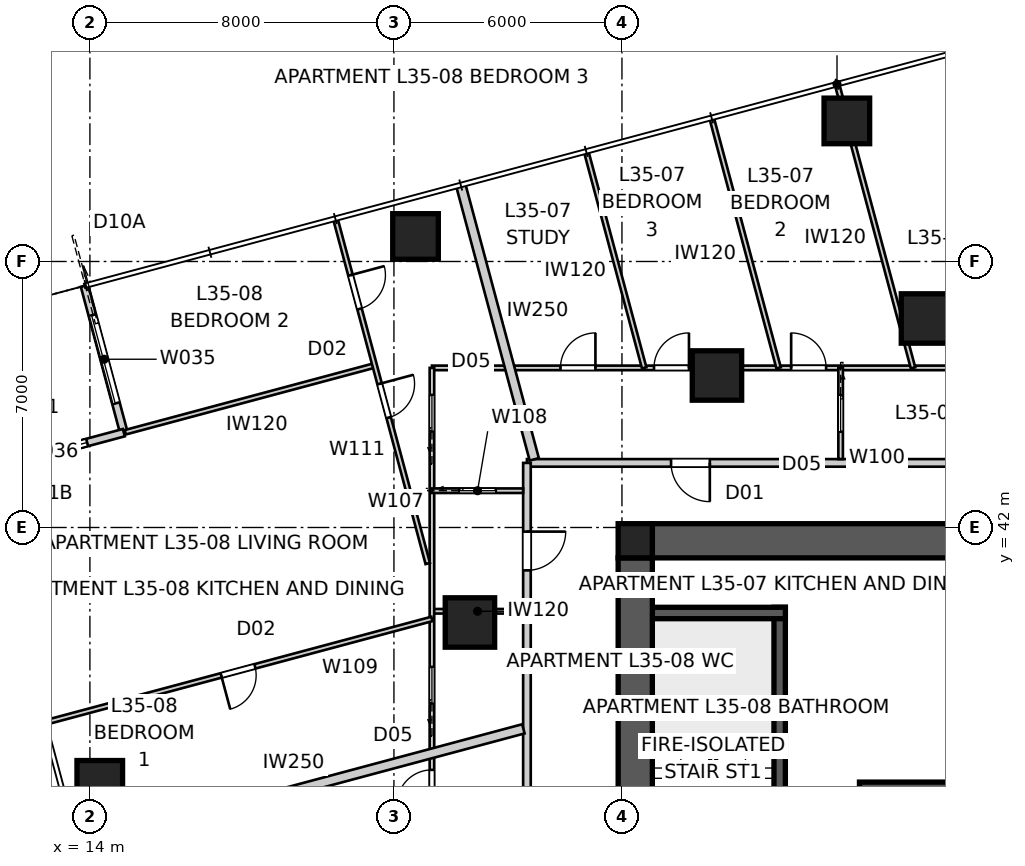
"""IFC4 building model, lengths in metres.
Left out: names, types, materials, properties, quantities, classifications, styles, units other than length and angle.
Written with IfcOpenShell. Run it as: python <this file> out.ifc"""

import sys

from ifc_helpers import new_model, si_unit, direction, frame, frame_2d, origin, origin_2d, place, context, subcontext, project, spatial, polyline, rectangle, outline, extrude, element, fill, save


model = new_model("IFC4")
c1 = context("Model", 3, precision=1e-05, world=origin(), true_north=direction((0.0, 1.0)))
c2 = subcontext(c1, "Body", "Model", "MODEL_VIEW")
j1 = project(units=[si_unit("LENGTHUNIT", "METRE"), si_unit("PLANEANGLEUNIT", "RADIAN")], contexts=[c1])
p1 = place(None, origin())
s1 = spatial("IfcSite", under=j1, at=p1, CompositionType="ELEMENT")
p2 = place(p1, origin())
s2 = spatial("IfcBuilding", under=s1, at=p2, CompositionType="ELEMENT")
p3 = place(p2, frame((0.0, 0.0, 128.6)))
s3 = spatial("IfcBuildingStorey", under=s2, at=p3, CompositionType="ELEMENT", Elevation=128.6)
p4 = place(p3, frame((28.8, 41.65, 0.0), z_axis=(0.0, 0.0, 1.0), x_axis=(1.0, 0.0, 0.0)))
e1 = element("IfcWall", 1, at=p4, inside=s3, PredefinedType="SHEAR", context=c2, shape_type="SweptSolid", body=[
    extrude(outline(polyline([(0.0, -0.45), (22.4, -0.45), (22.4, -0.025), (22.85, -0.025), (22.85, 0.025), (22.4, 0.025), (22.4, 0.45), (0.0, 0.45), (0.0, 0.025), (-0.45, 0.025), (-0.45, -0.025), (0.0, -0.025), (0.0, -0.45)])), origin(), (0.0, 0.0, 1.0), 3.4),
])
p5 = place(p3, frame((28.35, 41.2, 0.0), z_axis=(0.0, 0.0, 1.0), x_axis=(0.0, -1.0, 0.0)))
e2 = element("IfcWall", 2, at=p5, inside=s3, PredefinedType="SHEAR", context=c2, shape_type="SweptSolid", body=[
    extrude(outline(polyline([(0.0, -0.45), (22.4, -0.45), (22.4, -0.025), (22.85, -0.025), (22.85, 0.025), (22.4, 0.025), (22.4, 0.45), (0.0, 0.45), (0.0, 0.025), (-0.45, 0.025), (-0.45, -0.025), (0.0, -0.025), (0.0, -0.45)])), origin(), (0.0, 0.0, 1.0), 3.4),
])
p6 = place(p5, frame((11.14, 0.0, 0.0)))
e3 = element("IfcOpeningElement", 3, at=p6, cuts=e2, PredefinedType="OPENING", context=c2, shape_type="SweptSolid", body=[
    extrude(rectangle(XDim=1.02, YDim=2.4, at=frame_2d((0.51, 1.2))), frame((0.0, 0.46, 0.0), z_axis=(0.0, -1.0, 0.0), x_axis=(1.0, 0.0, 0.0)), (0.0, 0.0, 1.0), 0.92),
])
p7 = place(p3, frame((34.25, 35.15, 0.0), z_axis=(0.0, 0.0, 1.0), x_axis=(1.0, 0.0, 0.0)))
e4 = element("IfcWall", 4, at=p7, inside=s3, PredefinedType="SHEAR", context=c2, shape_type="SweptSolid", body=[
    extrude(rectangle(XDim=11.5, YDim=0.3, at=frame_2d((5.75, 0.0))), origin(), (0.0, 0.0, 1.0), 3.4),
])
p8 = place(p3, frame((32.15, 32.2, 0.0), z_axis=(0.0, 0.0, 1.0), x_axis=(0.0, 1.0, 0.0)))
e5 = element("IfcWall", 5, at=p8, inside=s3, PredefinedType="SHEAR", context=c2, shape_type="SweptSolid", body=[
    extrude(rectangle(XDim=7.7, YDim=0.3, at=frame_2d((3.85, 0.0))), origin(), (0.0, 0.0, 1.0), 3.4),
])
p9 = place(p3, frame((28.8, 39.75, 0.0), z_axis=(0.0, 0.0, 1.0), x_axis=(1.0, 0.0, 0.0)))
e6 = element("IfcWall", 6, at=p9, inside=s3, PredefinedType="SHEAR", context=c2, shape_type="SweptSolid", body=[
    extrude(rectangle(XDim=3.5, YDim=0.3, at=frame_2d((1.75, 0.0))), origin(), (0.0, 0.0, 1.0), 3.4),
])
p10 = place(p3, frame((28.35, 41.65, 0.0), z_axis=(0.0, 0.0, 1.0), x_axis=(1.0, 0.0, 0.0)))
e7 = element("IfcColumn", 7, at=p10, inside=s3, PredefinedType="COLUMN", context=c2, shape_type="SweptSolid", body=[
    extrude(rectangle(XDim=0.9, YDim=0.9, at=origin_2d()), origin(), (0.0, 0.0, 1.0), 3.4),
])
for number, where, z_axis, x_axis in (
    (8, (33.918, 52.699, 0.0), (0.0, 0.0, 1.0), (1.0, 0.0, 0.0)),
    (9, (22.568, 49.658, 0.0), (0.0, 0.0, 1.0), (1.0, 0.0, 0.0)),
    (10, (14.26, 35.267, 0.0), (0.0, 0.0, 1.0), (1.0, 0.0, 0.0)),
):
    element("IfcColumn", number, at=place(p3, frame(where, z_axis=z_axis, x_axis=x_axis)), inside=s3, PredefinedType="COLUMN", context=c2, shape_type="SweptSolid", body=[
        extrude(rectangle(XDim=1.2, YDim=1.2, at=origin_2d()), origin(), (0.0, 0.0, 1.0), 3.4),
    ])
for number, where, z_axis, x_axis in (
    (11, (36.0, 47.5, 0.0), (0.0, 0.0, 1.0), (1.0, 0.0, 0.0)),
    (12, (30.5, 46.0, 0.0), (0.0, 0.0, 1.0), (1.0, 0.0, 0.0)),
    (13, (24.0, 39.5, 0.0), (0.0, 0.0, 1.0), (1.0, 0.0, 0.0)),
):
    element("IfcColumn", number, at=place(p3, frame(where, z_axis=z_axis, x_axis=x_axis)), inside=s3, PredefinedType="COLUMN", context=c2, shape_type="SweptSolid", body=[
        extrude(rectangle(XDim=1.3, YDim=1.3, at=origin_2d()), origin(), (0.0, 0.0, 1.0), 3.4),
    ])
p11 = place(p3, frame((13.857, 48.359, 0.0), z_axis=(0.0, 0.0, 1.0), x_axis=(0.258843877716, -0.965919172068, 0.0)))
e14 = element("IfcWall", 14, at=p11, inside=s3, PredefinedType="SOLIDWALL", context=c2, shape_type="SweptSolid", body=[
    extrude(rectangle(XDim=4.0, YDim=0.2, at=frame_2d((2.0, 0.0))), origin(), (0.0, 0.0, 1.0), 3.25),
])
p12 = place(p11, frame((0.8, 0.0, 0.0)))
e15 = element("IfcOpeningElement", 15, at=p12, cuts=e14, PredefinedType="OPENING", context=c2, shape_type="SweptSolid", body=[
    extrude(rectangle(XDim=2.4, YDim=2.1, at=frame_2d((1.2, 1.05))), frame((0.0, 0.11, 0.0), z_axis=(0.0, -1.0, 0.0), x_axis=(1.0, 0.0, 0.0)), (0.0, 0.0, 1.0), 0.22),
])
p13 = place(p3, frame((14.893, 44.496, 0.0), z_axis=(0.0, 0.0, 1.0), x_axis=(-0.965934430412, -0.258786931944, 0.0)))
e16 = element("IfcWall", 16, at=p13, inside=s3, PredefinedType="SOLIDWALL", context=c2, shape_type="SweptSolid", body=[
    extrude(rectangle(XDim=4.0, YDim=0.2, at=frame_2d((2.0, 0.0))), origin(), (0.0, 0.0, 1.0), 3.25),
])
p14 = place(p13, frame((1.0, 0.0, 0.45)))
e17 = element("IfcOpeningElement", 17, at=p14, cuts=e16, PredefinedType="OPENING", context=c2, shape_type="SweptSolid", body=[
    extrude(rectangle(XDim=2.0, YDim=1.8, at=frame_2d((1.0, 0.9))), frame((0.0, 0.11, 0.0), z_axis=(0.0, -1.0, 0.0), x_axis=(1.0, 0.0, 0.0)), (0.0, 0.0, 1.0), 0.22),
])
p15 = place(p3, frame((52.52, 43.7, 0.0), z_axis=(0.0, 0.0, 1.0), x_axis=(-1.0, 0.0, 0.0)))
e18 = element("IfcWall", 18, at=p15, inside=s3, PredefinedType="PARTITIONING", context=c2, shape_type="SweptSolid", body=[
    extrude(rectangle(XDim=27.02, YDim=0.2, at=frame_2d((13.51, 0.0))), origin(), (0.0, 0.0, 1.0), 3.25),
])
p16 = place(p15, frame((22.208, 0.0, 0.0)))
e19 = element("IfcOpeningElement", 19, at=p16, cuts=e18, PredefinedType="OPENING", context=c2, shape_type="SweptSolid", body=[
    extrude(rectangle(XDim=1.02, YDim=2.34, at=frame_2d((0.51, 1.17))), frame((0.0, 0.11, 0.0), z_axis=(0.0, -1.0, 0.0), x_axis=(1.0, 0.0, 0.0)), (0.0, 0.0, 1.0), 0.22),
])
p17 = place(p15, frame((1.856, 0.0, 0.0)))
e20 = element("IfcOpeningElement", 20, at=p17, cuts=e18, PredefinedType="OPENING", context=c2, shape_type="SweptSolid", body=[
    extrude(rectangle(XDim=1.02, YDim=2.34, at=frame_2d((0.51, 1.17))), frame((0.0, 0.11, 0.0), z_axis=(0.0, -1.0, 0.0), x_axis=(1.0, 0.0, 0.0)), (0.0, 0.0, 1.0), 0.22),
])
p18 = place(p3, frame((25.5, 43.7, 0.0), z_axis=(0.0, 0.0, 1.0), x_axis=(0.0, -1.0, 0.0)))
e21 = element("IfcWall", 21, at=p18, inside=s3, PredefinedType="PARTITIONING", context=c2, shape_type="SweptSolid", body=[
    extrude(rectangle(XDim=28.2, YDim=0.2, at=frame_2d((14.1, 0.0))), origin(), (0.0, 0.0, 1.0), 3.25),
])
p19 = place(p18, frame((8.742, 0.0, 0.0)))
e22 = element("IfcOpeningElement", 22, at=p19, cuts=e21, PredefinedType="OPENING", context=c2, shape_type="SweptSolid", body=[
    extrude(rectangle(XDim=1.02, YDim=2.34, at=frame_2d((0.51, 1.17))), frame((0.0, 0.11, 0.0), z_axis=(0.0, -1.0, 0.0), x_axis=(1.0, 0.0, 0.0)), (0.0, 0.0, 1.0), 0.22),
])
p20 = place(p18, frame((1.808, 0.0, 0.0)))
e23 = element("IfcOpeningElement", 23, at=p20, cuts=e21, PredefinedType="OPENING", context=c2, shape_type="SweptSolid", body=[
    extrude(rectangle(XDim=1.02, YDim=2.1, at=frame_2d((0.51, 1.05))), frame((0.0, 0.11, 0.0), z_axis=(0.0, -1.0, 0.0), x_axis=(1.0, 0.0, 0.0)), (0.0, 0.0, 1.0), 0.22),
])
p21 = place(p3, frame((23.758, 51.012, 0.0), z_axis=(0.0, 0.0, 1.0), x_axis=(0.258805213744, -0.965929532284, 0.0)))
e24 = element("IfcWall", 24, at=p21, inside=s3, PredefinedType="PARTITIONING", context=c2, shape_type="SweptSolid", body=[
    extrude(rectangle(XDim=7.473, YDim=0.25, at=frame_2d((3.737, 0.0))), origin(), (0.0, 0.0, 1.0), 3.25),
])
p22 = place(p3, frame((13.682, 33.56, 0.0), z_axis=(0.0, 0.0, 1.0), x_axis=(0.965924438766, 0.258824223352, 0.0)))
e25 = element("IfcWall", 25, at=p22, inside=s3, PredefinedType="PARTITIONING", context=c2, shape_type="SweptSolid", body=[
    extrude(rectangle(XDim=12.138, YDim=0.25, at=frame_2d((6.069, 0.0))), origin(), (0.0, 0.0, 1.0), 3.25),
])
p23 = place(p3, frame((23.0, 46.2, 0.0), z_axis=(0.0, 0.0, 1.0), x_axis=(1.0, 0.0, 0.0)))
e26 = element("IfcWall", 26, at=p23, inside=s3, PredefinedType="PARTITIONING", context=c2, shape_type="SweptSolid", body=[
    extrude(rectangle(XDim=33.2, YDim=0.12, at=frame_2d((16.6, 0.0))), origin(), (0.0, 0.0, 1.0), 2.55),
])
p24 = place(p23, frame((5.844, 0.0, 0.0)))
e27 = element("IfcOpeningElement", 27, at=p24, cuts=e26, PredefinedType="OPENING", context=c2, shape_type="SweptSolid", body=[
    extrude(rectangle(XDim=0.92, YDim=2.34, at=frame_2d((0.46, 1.17))), frame((0.0, 0.07, 0.0), z_axis=(0.0, -1.0, 0.0), x_axis=(1.0, 0.0, 0.0)), (0.0, 0.0, 1.0), 0.14),
])
p25 = place(p23, frame((3.382, 0.0, 0.0)))
e28 = element("IfcOpeningElement", 28, at=p25, cuts=e26, PredefinedType="OPENING", context=c2, shape_type="SweptSolid", body=[
    extrude(rectangle(XDim=0.92, YDim=2.34, at=frame_2d((0.46, 1.17))), frame((0.0, 0.07, 0.0), z_axis=(0.0, -1.0, 0.0), x_axis=(1.0, 0.0, 0.0)), (0.0, 0.0, 1.0), 0.14),
])
p26 = place(p23, frame((9.452, 0.0, 0.0)))
e29 = element("IfcOpeningElement", 29, at=p26, cuts=e26, PredefinedType="OPENING", context=c2, shape_type="SweptSolid", body=[
    extrude(rectangle(XDim=0.92, YDim=2.34, at=frame_2d((0.46, 1.17))), frame((0.0, 0.07, 0.0), z_axis=(0.0, -1.0, 0.0), x_axis=(1.0, 0.0, 0.0)), (0.0, 0.0, 1.0), 0.14),
])
p27 = place(p23, frame((27.775, 0.0, 0.0)))
e30 = element("IfcOpeningElement", 30, at=p27, cuts=e26, PredefinedType="OPENING", context=c2, shape_type="SweptSolid", body=[
    extrude(rectangle(XDim=0.92, YDim=2.34, at=frame_2d((0.46, 1.17))), frame((0.0, 0.07, 0.0), z_axis=(0.0, -1.0, 0.0), x_axis=(1.0, 0.0, 0.0)), (0.0, 0.0, 1.0), 0.14),
])
p28 = place(p23, frame((15.05, 0.0, 0.0)))
e31 = element("IfcOpeningElement", 31, at=p28, cuts=e26, PredefinedType="OPENING", context=c2, shape_type="SweptSolid", body=[
    extrude(rectangle(XDim=0.96, YDim=2.1, at=frame_2d((0.48, 1.05))), frame((0.0, 0.07, 0.0), z_axis=(0.0, -1.0, 0.0), x_axis=(1.0, 0.0, 0.0)), (0.0, 0.0, 1.0), 0.14),
])
p29 = place(p3, frame((33.754, 46.2, 0.0), z_axis=(0.0, 0.0, 1.0), x_axis=(0.0, -1.0, 0.0)))
e32 = element("IfcWall", 32, at=p29, inside=s3, PredefinedType="PARTITIONING", context=c2, shape_type="SweptSolid", body=[
    extrude(rectangle(XDim=2.4, YDim=0.12, at=frame_2d((1.2, 0.0))), origin(), (0.0, 0.0, 1.0), 3.25),
])
p30 = place(p29, frame((0.72, 0.0, 0.0)))
e33 = element("IfcOpeningElement", 33, at=p30, cuts=e32, PredefinedType="OPENING", context=c2, shape_type="SweptSolid", body=[
    extrude(rectangle(XDim=0.96, YDim=2.1, at=frame_2d((0.48, 1.05))), frame((0.0, 0.07, 0.0), z_axis=(0.0, -1.0, 0.0), x_axis=(1.0, 0.0, 0.0)), (0.0, 0.0, 1.0), 0.14),
])
p31 = place(p3, frame((35.659, 46.2, 0.0), z_axis=(0.0, 0.0, 1.0), x_axis=(-0.258826555959, 0.96592381373, 0.0)))
e34 = element("IfcWall", 34, at=p31, inside=s3, PredefinedType="PARTITIONING", context=c2, shape_type="SweptSolid", body=[
    extrude(rectangle(XDim=7.688, YDim=0.12, at=frame_2d((3.844, 0.0))), origin(), (0.0, 0.0, 1.0), 3.25),
])
p32 = place(p3, frame((32.122, 46.2, 0.0), z_axis=(0.0, 0.0, 1.0), x_axis=(-0.258811158187, 0.965927939547, 0.0)))
e35 = element("IfcWall", 35, at=p32, inside=s3, PredefinedType="PARTITIONING", context=c2, shape_type="SweptSolid", body=[
    extrude(rectangle(XDim=6.773, YDim=0.12, at=frame_2d((3.386, 0.0))), origin(), (0.0, 0.0, 1.0), 3.25),
])
p33 = place(p3, frame((28.585, 46.2, 0.0), z_axis=(0.0, 0.0, 1.0), x_axis=(-0.258790947109, 0.965933354686, 0.0)))
e36 = element("IfcWall", 36, at=p33, inside=s3, PredefinedType="PARTITIONING", context=c2, shape_type="SweptSolid", body=[
    extrude(rectangle(XDim=5.857, YDim=0.12, at=frame_2d((2.929, 0.0))), origin(), (0.0, 0.0, 1.0), 3.25),
])
p34 = place(p3, frame((25.4, 39.795, 0.0), z_axis=(0.0, 0.0, 1.0), x_axis=(-1.0, 0.0, 0.0)))
e37 = element("IfcWall", 37, at=p34, inside=s3, PredefinedType="PARTITIONING", context=c2, shape_type="SweptSolid", body=[
    extrude(rectangle(XDim=2.4, YDim=0.12, at=frame_2d((1.2, 0.0))), origin(), (0.0, 0.0, 1.0), 3.25),
])
p35 = place(p3, frame((23.0, 28.93, 0.0), z_axis=(0.0, 0.0, 1.0), x_axis=(0.0, 1.0, 0.0)))
e38 = element("IfcWall", 38, at=p35, inside=s3, PredefinedType="PARTITIONING", context=c2, shape_type="SweptSolid", body=[
    extrude(rectangle(XDim=17.27, YDim=0.12, at=frame_2d((8.635, 0.0))), origin(), (0.0, 0.0, 1.0), 2.55),
])
p36 = place(p35, frame((5.772, 0.0, 0.0)))
e39 = element("IfcOpeningElement", 39, at=p36, cuts=e38, PredefinedType="OPENING", context=c2, shape_type="SweptSolid", body=[
    extrude(rectangle(XDim=0.92, YDim=2.34, at=frame_2d((0.46, 1.17))), frame((0.0, 0.07, 0.0), z_axis=(0.0, -1.0, 0.0), x_axis=(1.0, 0.0, 0.0)), (0.0, 0.0, 1.0), 0.14),
])
p37 = place(p35, frame((15.599, 0.0, 0.0)))
e40 = element("IfcOpeningElement", 40, at=p37, cuts=e38, PredefinedType="OPENING", context=c2, shape_type="SweptSolid", body=[
    extrude(rectangle(XDim=0.96, YDim=2.1, at=frame_2d((0.48, 1.05))), frame((0.0, 0.07, 0.0), z_axis=(0.0, -1.0, 0.0), x_axis=(1.0, 0.0, 0.0)), (0.0, 0.0, 1.0), 0.14),
])
p38 = place(p35, frame((8.441, 0.0, 0.0)))
e41 = element("IfcOpeningElement", 41, at=p38, cuts=e38, PredefinedType="OPENING", context=c2, shape_type="SweptSolid", body=[
    extrude(rectangle(XDim=0.96, YDim=2.1, at=frame_2d((0.48, 1.05))), frame((0.0, 0.07, 0.0), z_axis=(0.0, -1.0, 0.0), x_axis=(1.0, 0.0, 0.0)), (0.0, 0.0, 1.0), 0.14),
])
p39 = place(p3, frame((23.0, 42.968, 0.0), z_axis=(0.0, 0.0, 1.0), x_axis=(1.0, 0.0, 0.0)))
e42 = element("IfcWall", 42, at=p39, inside=s3, PredefinedType="PARTITIONING", context=c2, shape_type="SweptSolid", body=[
    extrude(rectangle(XDim=2.4, YDim=0.12, at=frame_2d((1.2, 0.0))), origin(), (0.0, 0.0, 1.0), 3.25),
])
p40 = place(p39, frame((0.72, 0.0, 0.0)))
e43 = element("IfcOpeningElement", 43, at=p40, cuts=e42, PredefinedType="OPENING", context=c2, shape_type="SweptSolid", body=[
    extrude(rectangle(XDim=0.96, YDim=2.1, at=frame_2d((0.48, 1.05))), frame((0.0, 0.07, 0.0), z_axis=(0.0, -1.0, 0.0), x_axis=(1.0, 0.0, 0.0)), (0.0, 0.0, 1.0), 0.14),
])
p41 = place(p3, frame((23.0, 39.594, 0.0), z_axis=(0.0, 0.0, 1.0), x_axis=(-0.9659257847, -0.258819200315, 0.0)))
e44 = element("IfcWall", 44, at=p41, inside=s3, PredefinedType="PARTITIONING", context=c2, shape_type="SweptSolid", body=[
    extrude(rectangle(XDim=10.522, YDim=0.12, at=frame_2d((5.261, 0.0))), origin(), (0.0, 0.0, 1.0), 2.722),
])
p42 = place(p41, frame((4.821, 0.0, 0.0)))
e45 = element("IfcOpeningElement", 45, at=p42, cuts=e44, PredefinedType="OPENING", context=c2, shape_type="SweptSolid", body=[
    extrude(rectangle(XDim=0.92, YDim=2.34, at=frame_2d((0.46, 1.17))), frame((0.0, 0.07, 0.0), z_axis=(0.0, -1.0, 0.0), x_axis=(1.0, 0.0, 0.0)), (0.0, 0.0, 1.0), 0.14),
])
p43 = place(p3, frame((14.931, 44.506, 0.0), z_axis=(0.0, 0.0, 1.0), x_axis=(0.965922865286, 0.258830095464, 0.0)))
e46 = element("IfcWall", 46, at=p43, inside=s3, PredefinedType="PARTITIONING", context=c2, shape_type="SweptSolid", body=[
    extrude(rectangle(XDim=6.793, YDim=0.12, at=frame_2d((3.396, 0.0))), origin(), (0.0, 0.0, 1.0), 3.25),
])
p44 = place(p3, frame((20.468, 50.089, 0.0), z_axis=(0.0, 0.0, 1.0), x_axis=(0.25881390457, -0.965927203676, 0.0)))
e47 = element("IfcWall", 47, at=p44, inside=s3, PredefinedType="PARTITIONING", context=c2, shape_type="SweptSolid", body=[
    extrude(rectangle(XDim=9.357, YDim=0.12, at=frame_2d((4.678, 0.0))), origin(), (0.0, 0.0, 1.0), 2.638),
])
p45 = place(p44, frame((4.461, 0.0, 0.0)))
e48 = element("IfcOpeningElement", 48, at=p45, cuts=e47, PredefinedType="OPENING", context=c2, shape_type="SweptSolid", body=[
    extrude(rectangle(XDim=0.92, YDim=2.34, at=frame_2d((0.46, 1.17))), frame((0.0, 0.07, 0.0), z_axis=(0.0, -1.0, 0.0), x_axis=(1.0, 0.0, 0.0)), (0.0, 0.0, 1.0), 0.14),
])
p46 = place(p44, frame((1.5, 0.0, 0.0)))
e49 = element("IfcOpeningElement", 49, at=p46, cuts=e47, PredefinedType="OPENING", context=c2, shape_type="SweptSolid", body=[
    extrude(rectangle(XDim=0.92, YDim=2.34, at=frame_2d((0.46, 1.17))), frame((0.0, 0.07, 0.0), z_axis=(0.0, -1.0, 0.0), x_axis=(1.0, 0.0, 0.0)), (0.0, 0.0, 1.0), 0.14),
])
p47 = place(p12, origin())
e50 = element("IfcDoor", 50, at=p47, inside=s3, OperationType="SLIDING_TO_LEFT", PredefinedType="DOOR", context=c2, shape_type="SweptSolid", body=[
    extrude(rectangle(XDim=2.4, YDim=2.1, at=frame_2d((1.2, 1.05))), frame((0.0, 0.025, 0.0), z_axis=(0.0, -1.0, 0.0), x_axis=(1.0, 0.0, 0.0)), (0.0, 0.0, 1.0), 0.05),
])
fill(e15, e50)
p48 = place(p14, origin())
e51 = element("IfcWindow", 51, at=p48, inside=s3, PartitioningType="SINGLE_PANEL", PredefinedType="WINDOW", context=c2, shape_type="SweptSolid", body=[
    extrude(rectangle(XDim=2.0, YDim=1.8, at=frame_2d((1.0, 0.9))), frame((0.0, 0.03, 0.0), z_axis=(0.0, -1.0, 0.0), x_axis=(1.0, 0.0, 0.0)), (0.0, 0.0, 1.0), 0.06),
])
fill(e17, e51)
p49 = place(p16, origin())
e52 = element("IfcDoor", 52, at=p49, inside=s3, OperationType="SINGLE_SWING_LEFT", PredefinedType="DOOR", context=c2, shape_type="SweptSolid", body=[
    extrude(rectangle(XDim=1.02, YDim=2.34, at=frame_2d((0.51, 1.17))), frame((0.0, 0.025, 0.0), z_axis=(0.0, -1.0, 0.0), x_axis=(1.0, 0.0, 0.0)), (0.0, 0.0, 1.0), 0.05),
])
fill(e19, e52)
p50 = place(p20, origin())
e53 = element("IfcDoor", 53, at=p50, inside=s3, OperationType="SINGLE_SWING_LEFT", PredefinedType="DOOR", context=c2, shape_type="SweptSolid", body=[
    extrude(rectangle(XDim=1.02, YDim=2.1, at=frame_2d((0.51, 1.05))), frame((0.0, 0.025, 0.0), z_axis=(0.0, -1.0, 0.0), x_axis=(1.0, 0.0, 0.0)), (0.0, 0.0, 1.0), 0.05),
])
fill(e23, e53)
p51 = place(p24, origin())
e54 = element("IfcDoor", 54, at=p51, inside=s3, OperationType="SINGLE_SWING_RIGHT", PredefinedType="DOOR", context=c2, shape_type="SweptSolid", body=[
    extrude(rectangle(XDim=0.92, YDim=2.34, at=frame_2d((0.46, 1.17))), frame((0.0, 0.025, 0.0), z_axis=(0.0, -1.0, 0.0), x_axis=(1.0, 0.0, 0.0)), (0.0, 0.0, 1.0), 0.05),
])
fill(e27, e54)
p52 = place(p25, origin())
e55 = element("IfcDoor", 55, at=p52, inside=s3, OperationType="SINGLE_SWING_RIGHT", PredefinedType="DOOR", context=c2, shape_type="SweptSolid", body=[
    extrude(rectangle(XDim=0.92, YDim=2.34, at=frame_2d((0.46, 1.17))), frame((0.0, 0.025, 0.0), z_axis=(0.0, -1.0, 0.0), x_axis=(1.0, 0.0, 0.0)), (0.0, 0.0, 1.0), 0.05),
])
fill(e28, e55)
p53 = place(p30, origin())
e56 = element("IfcDoor", 56, at=p53, inside=s3, OperationType="SLIDING_TO_LEFT", PredefinedType="DOOR", context=c2, shape_type="SweptSolid", body=[
    extrude(rectangle(XDim=0.96, YDim=2.1, at=frame_2d((0.48, 1.05))), frame((0.0, 0.025, 0.0), z_axis=(0.0, -1.0, 0.0), x_axis=(1.0, 0.0, 0.0)), (0.0, 0.0, 1.0), 0.05),
])
fill(e33, e56)
p54 = place(p26, origin())
e57 = element("IfcDoor", 57, at=p54, inside=s3, OperationType="SINGLE_SWING_LEFT", PredefinedType="DOOR", context=c2, shape_type="SweptSolid", body=[
    extrude(rectangle(XDim=0.92, YDim=2.34, at=frame_2d((0.46, 1.17))), frame((0.0, 0.025, 0.0), z_axis=(0.0, -1.0, 0.0), x_axis=(1.0, 0.0, 0.0)), (0.0, 0.0, 1.0), 0.05),
])
fill(e29, e57)
p55 = place(p36, origin())
e58 = element("IfcDoor", 58, at=p55, inside=s3, OperationType="SINGLE_SWING_LEFT", PredefinedType="DOOR", context=c2, shape_type="SweptSolid", body=[
    extrude(rectangle(XDim=0.92, YDim=2.34, at=frame_2d((0.46, 1.17))), frame((0.0, 0.025, 0.0), z_axis=(0.0, -1.0, 0.0), x_axis=(1.0, 0.0, 0.0)), (0.0, 0.0, 1.0), 0.05),
])
fill(e39, e58)
p56 = place(p40, origin())
e59 = element("IfcDoor", 59, at=p56, inside=s3, OperationType="SLIDING_TO_LEFT", PredefinedType="DOOR", context=c2, shape_type="SweptSolid", body=[
    extrude(rectangle(XDim=0.96, YDim=2.1, at=frame_2d((0.48, 1.05))), frame((0.0, 0.025, 0.0), z_axis=(0.0, -1.0, 0.0), x_axis=(1.0, 0.0, 0.0)), (0.0, 0.0, 1.0), 0.05),
])
fill(e43, e59)
p57 = place(p37, origin())
e60 = element("IfcDoor", 60, at=p57, inside=s3, OperationType="SLIDING_TO_LEFT", PredefinedType="DOOR", context=c2, shape_type="SweptSolid", body=[
    extrude(rectangle(XDim=0.96, YDim=2.1, at=frame_2d((0.48, 1.05))), frame((0.0, 0.025, 0.0), z_axis=(0.0, -1.0, 0.0), x_axis=(1.0, 0.0, 0.0)), (0.0, 0.0, 1.0), 0.05),
])
fill(e40, e60)
p58 = place(p45, origin())
e61 = element("IfcDoor", 61, at=p58, inside=s3, OperationType="SINGLE_SWING_LEFT", PredefinedType="DOOR", context=c2, shape_type="SweptSolid", body=[
    extrude(rectangle(XDim=0.92, YDim=2.34, at=frame_2d((0.46, 1.17))), frame((0.0, 0.025, 0.0), z_axis=(0.0, -1.0, 0.0), x_axis=(1.0, 0.0, 0.0)), (0.0, 0.0, 1.0), 0.05),
])
fill(e48, e61)
p59 = place(p46, origin())
e62 = element("IfcDoor", 62, at=p59, inside=s3, OperationType="SINGLE_SWING_LEFT", PredefinedType="DOOR", context=c2, shape_type="SweptSolid", body=[
    extrude(rectangle(XDim=0.92, YDim=2.34, at=frame_2d((0.46, 1.17))), frame((0.0, 0.025, 0.0), z_axis=(0.0, -1.0, 0.0), x_axis=(1.0, 0.0, 0.0)), (0.0, 0.0, 1.0), 0.05),
])
fill(e49, e62)
p60 = place(p42, origin())
e63 = element("IfcDoor", 63, at=p60, inside=s3, OperationType="SINGLE_SWING_RIGHT", PredefinedType="DOOR", context=c2, shape_type="SweptSolid", body=[
    extrude(rectangle(XDim=0.92, YDim=2.34, at=frame_2d((0.46, 1.17))), frame((0.0, 0.025, 0.0), z_axis=(0.0, -1.0, 0.0), x_axis=(1.0, 0.0, 0.0)), (0.0, 0.0, 1.0), 0.05),
])
fill(e45, e63)
p61 = place(p38, origin())
e64 = element("IfcDoor", 64, at=p61, inside=s3, OperationType="SLIDING_TO_LEFT", PredefinedType="DOOR", context=c2, shape_type="SweptSolid", body=[
    extrude(rectangle(XDim=0.96, YDim=2.1, at=frame_2d((0.48, 1.05))), frame((0.0, 0.025, 0.0), z_axis=(0.0, -1.0, 0.0), x_axis=(1.0, 0.0, 0.0)), (0.0, 0.0, 1.0), 0.05),
])
fill(e41, e64)
save(model, sys.argv[1])
